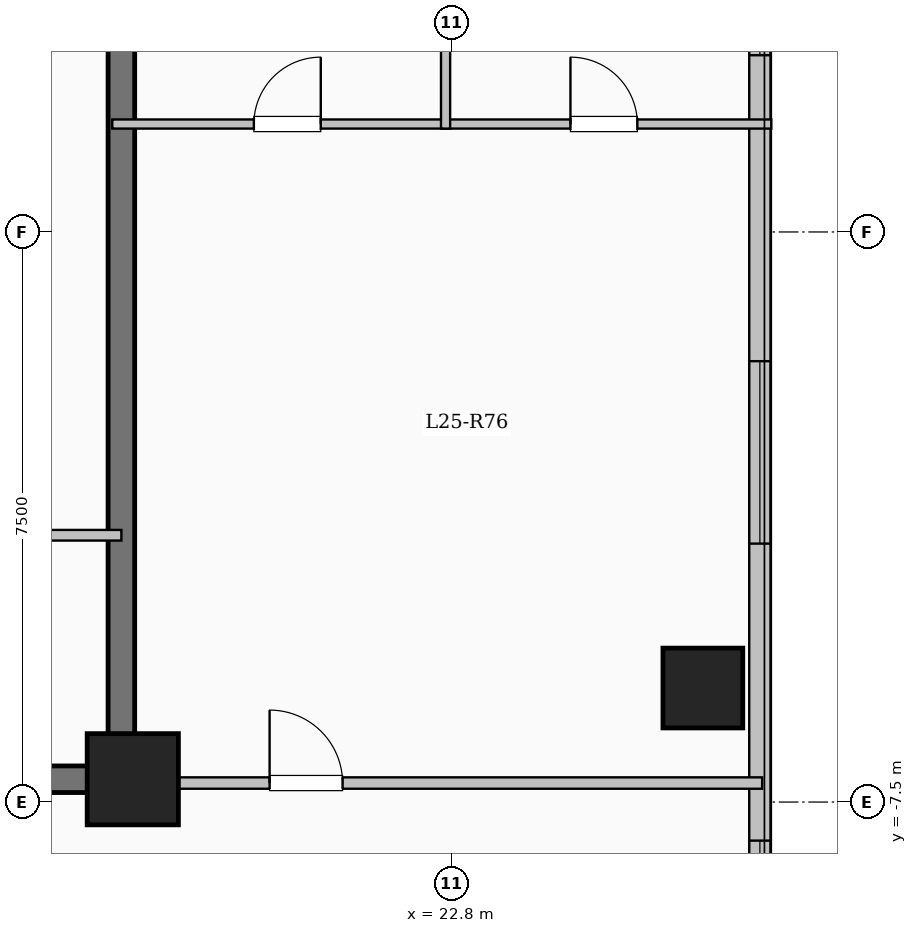
"""IFC4 building model, lengths in metres.
Left out: names, types, materials, properties, quantities, classifications, styles, units other than length and angle.
Written with IfcOpenShell. Run it as: python <this file> out.ifc"""

import sys

from ifc_helpers import new_model, si_unit, direction, frame, frame_2d, origin, origin_2d, place, context, subcontext, project, spatial, rectangle, extrude, element, fill, save


model = new_model("IFC4")
c1 = context("Model", 3, precision=1e-05, world=origin(), true_north=direction((0.0, 1.0)))
c2 = subcontext(c1, "Body", "Model", "MODEL_VIEW")
j1 = project(units=[si_unit("LENGTHUNIT", "METRE"), si_unit("PLANEANGLEUNIT", "RADIAN")], contexts=[c1])
p1 = place(None, origin())
s1 = spatial("IfcSite", under=j1, at=p1, CompositionType="ELEMENT")
p2 = place(p1, origin())
s2 = spatial("IfcBuilding", under=s1, at=p2, CompositionType="ELEMENT")
p3 = place(p2, frame((0.0, 0.0, 95.05)))
s3 = spatial("IfcBuildingStorey", under=s2, at=p3, CompositionType="ELEMENT", Elevation=95.05)
p4 = place(p3, frame((18.6, -7.2, 0.0), z_axis=(0.0, 0.0, 1.0), x_axis=(1.0, 0.0, 0.0)))
e1 = element("IfcColumn", 1, at=p4, inside=s3, PredefinedType="COLUMN", context=c2, shape_type="SweptSolid", body=[
    extrude(rectangle(XDim=1.2, YDim=1.2, at=origin_2d()), origin(), (0.0, 0.0, 1.0), 3.35),
])
p5 = place(p3, frame((26.1, -6.0, 0.0), z_axis=(0.0, 0.0, 1.0), x_axis=(1.0, 0.0, 0.0)))
e2 = element("IfcColumn", 2, at=p5, inside=s3, PredefinedType="COLUMN", context=c2, shape_type="SweptSolid", body=[
    extrude(rectangle(XDim=1.05, YDim=1.05, at=origin_2d()), origin(), (0.0, 0.0, 1.0), 3.35),
])
p6 = place(p3, frame((26.85, 17.85, 0.0), z_axis=(0.0, 0.0, 1.0), x_axis=(0.0, -1.0, 0.0)))
e3 = element("IfcWall", 3, at=p6, inside=s3, PredefinedType="SOLIDWALL", context=c2, shape_type="SweptSolid", body=[
    extrude(rectangle(XDim=35.7, YDim=0.28, at=frame_2d((17.85, 0.0))), origin(), (0.0, 0.0, 1.0), 3.1),
])
p7 = place(p6, frame((1.675, 0.0, 0.9)))
e4 = element("IfcOpeningElement", 4, at=p7, cuts=e3, PredefinedType="OPENING", context=c2, shape_type="SweptSolid", body=[
    extrude(rectangle(XDim=2.0, YDim=1.7, at=frame_2d((1.0, 0.85))), frame((0.0, 0.15, 0.0), z_axis=(0.0, -1.0, 0.0), x_axis=(1.0, 0.0, 0.0)), (0.0, 0.0, 1.0), 0.3),
])
p8 = place(p6, frame((5.725, 0.0, 0.95)))
e5 = element("IfcOpeningElement", 5, at=p8, cuts=e3, PredefinedType="OPENING", context=c2, shape_type="SweptSolid", body=[
    extrude(rectangle(XDim=1.0, YDim=1.5, at=frame_2d((0.5, 0.75))), frame((0.0, 0.15, 0.0), z_axis=(0.0, -1.0, 0.0), x_axis=(1.0, 0.0, 0.0)), (0.0, 0.0, 1.0), 0.3),
])
p9 = place(p6, frame((8.975, 0.0, 0.9)))
e6 = element("IfcOpeningElement", 6, at=p9, cuts=e3, PredefinedType="OPENING", context=c2, shape_type="SweptSolid", body=[
    extrude(rectangle(XDim=2.0, YDim=1.7, at=frame_2d((1.0, 0.85))), frame((0.0, 0.15, 0.0), z_axis=(0.0, -1.0, 0.0), x_axis=(1.0, 0.0, 0.0)), (0.0, 0.0, 1.0), 0.3),
])
p10 = place(p6, frame((13.725, 0.0, 0.9)))
e7 = element("IfcOpeningElement", 7, at=p10, cuts=e3, PredefinedType="OPENING", context=c2, shape_type="SweptSolid", body=[
    extrude(rectangle(XDim=1.8, YDim=1.65, at=frame_2d((0.9, 0.825))), frame((0.0, 0.15, 0.0), z_axis=(0.0, -1.0, 0.0), x_axis=(1.0, 0.0, 0.0)), (0.0, 0.0, 1.0), 0.3),
])
p11 = place(p6, frame((19.55, 0.0, 0.9)))
e8 = element("IfcOpeningElement", 8, at=p11, cuts=e3, PredefinedType="OPENING", context=c2, shape_type="SweptSolid", body=[
    extrude(rectangle(XDim=2.4, YDim=1.8, at=frame_2d((1.2, 0.9))), frame((0.0, 0.15, 0.0), z_axis=(0.0, -1.0, 0.0), x_axis=(1.0, 0.0, 0.0)), (0.0, 0.0, 1.0), 0.3),
])
p12 = place(p6, frame((25.857, 0.0, 0.9)))
e9 = element("IfcOpeningElement", 9, at=p12, cuts=e3, PredefinedType="OPENING", context=c2, shape_type="SweptSolid", body=[
    extrude(rectangle(XDim=1.5, YDim=1.65, at=frame_2d((0.75, 0.825))), frame((0.0, 0.15, 0.0), z_axis=(0.0, -1.0, 0.0), x_axis=(1.0, 0.0, 0.0)), (0.0, 0.0, 1.0), 0.3),
])
p13 = place(p6, frame((30.75, 0.0, 0.9)))
e10 = element("IfcOpeningElement", 10, at=p13, cuts=e3, PredefinedType="OPENING", context=c2, shape_type="SweptSolid", body=[
    extrude(rectangle(XDim=2.4, YDim=1.8, at=frame_2d((1.2, 0.9))), frame((0.0, 0.15, 0.0), z_axis=(0.0, -1.0, 0.0), x_axis=(1.0, 0.0, 0.0)), (0.0, 0.0, 1.0), 0.3),
])
p14 = place(p3, frame((18.45, -7.375, 0.0), z_axis=(0.0, 0.0, 1.0), x_axis=(0.0, 1.0, 0.0)))
e11 = element("IfcWall", 11, at=p14, inside=s3, PredefinedType="SHEAR", context=c2, shape_type="SweptSolid", body=[
    extrude(rectangle(XDim=14.05, YDim=0.35, at=frame_2d((7.025, 0.0))), origin(), (0.0, 0.0, 1.0), 3.35),
])
p15 = place(p3, frame((10.075, -7.2, 0.0), z_axis=(0.0, 0.0, 1.0), x_axis=(1.0, 0.0, 0.0)))
e12 = element("IfcWall", 12, at=p15, inside=s3, PredefinedType="SHEAR", context=c2, shape_type="SweptSolid", body=[
    extrude(rectangle(XDim=8.55, YDim=0.35, at=frame_2d((4.275, 0.0))), origin(), (0.0, 0.0, 1.0), 3.35),
])
p16 = place(p3, frame((15.4, -3.99, 0.0), z_axis=(0.0, 0.0, 1.0), x_axis=(1.0, 0.0, 0.0)))
e13 = element("IfcWall", 13, at=p16, inside=s3, PredefinedType="PARTITIONING", context=c2, shape_type="SweptSolid", body=[
    extrude(rectangle(XDim=3.05, YDim=0.14, at=frame_2d((1.525, 0.0))), origin(), (0.0, 0.0, 1.0), 3.1),
])
p17 = place(p16, frame((1.05, 0.0, 0.0)))
e14 = element("IfcOpeningElement", 14, at=p17, cuts=e13, PredefinedType="OPENING", context=c2, shape_type="SweptSolid", body=[
    extrude(rectangle(XDim=0.9, YDim=2.08, at=frame_2d((0.45, 1.04))), frame((0.0, 0.08, 0.0), z_axis=(0.0, -1.0, 0.0), x_axis=(1.0, 0.0, 0.0)), (0.0, 0.0, 1.0), 0.16),
])
p18 = place(p3, frame((18.45, -7.25, 0.0), z_axis=(0.0, 0.0, 1.0), x_axis=(1.0, 0.0, 0.0)))
e15 = element("IfcWall", 15, at=p18, inside=s3, PredefinedType="PARTITIONING", context=c2, shape_type="SweptSolid", body=[
    extrude(rectangle(XDim=8.43, YDim=0.15, at=frame_2d((4.215, 0.0))), origin(), (0.0, 0.0, 1.0), 3.1),
])
p19 = place(p18, frame((1.95, 0.0, 0.0)))
e16 = element("IfcOpeningElement", 16, at=p19, cuts=e15, PredefinedType="OPENING", context=c2, shape_type="SweptSolid", body=[
    extrude(rectangle(XDim=0.96, YDim=2.15, at=frame_2d((0.48, 1.075))), frame((0.0, 0.085, 0.0), z_axis=(0.0, -1.0, 0.0), x_axis=(1.0, 0.0, 0.0)), (0.0, 0.0, 1.0), 0.17),
])
p20 = place(p3, frame((18.33, 1.42, 0.0), z_axis=(0.0, 0.0, 1.0), x_axis=(1.0, 0.0, 0.0)))
e17 = element("IfcWall", 17, at=p20, inside=s3, PredefinedType="PARTITIONING", context=c2, shape_type="SweptSolid", body=[
    extrude(rectangle(XDim=8.67, YDim=0.12, at=frame_2d((4.335, 0.0))), origin(), (0.0, 0.0, 1.0), 3.1),
])
p21 = place(p20, frame((1.863, 0.0, 0.0)))
e18 = element("IfcOpeningElement", 18, at=p21, cuts=e17, PredefinedType="OPENING", context=c2, shape_type="SweptSolid", body=[
    extrude(rectangle(XDim=0.88, YDim=2.1, at=frame_2d((0.44, 1.05))), frame((0.0, 0.07, 0.0), z_axis=(0.0, -1.0, 0.0), x_axis=(1.0, 0.0, 0.0)), (0.0, 0.0, 1.0), 0.14),
])
p22 = place(p20, frame((6.028, 0.0, 0.0)))
e19 = element("IfcOpeningElement", 19, at=p22, cuts=e17, PredefinedType="OPENING", context=c2, shape_type="SweptSolid", body=[
    extrude(rectangle(XDim=0.88, YDim=2.1, at=frame_2d((0.44, 1.05))), frame((0.0, 0.07, 0.0), z_axis=(0.0, -1.0, 0.0), x_axis=(1.0, 0.0, 0.0)), (0.0, 0.0, 1.0), 0.14),
])
p23 = place(p3, frame((22.715, 1.36, 0.0), z_axis=(0.0, 0.0, 1.0), x_axis=(0.0, 1.0, 0.0)))
e20 = element("IfcWall", 20, at=p23, inside=s3, PredefinedType="PARTITIONING", context=c2, shape_type="SweptSolid", body=[
    extrude(rectangle(XDim=3.58, YDim=0.12, at=frame_2d((1.79, 0.0))), origin(), (0.0, 0.0, 1.0), 3.1),
])
p24 = place(p10, origin())
e21 = element("IfcWindow", 21, at=p24, inside=s3, PartitioningType="SINGLE_PANEL", PredefinedType="WINDOW", context=c2, shape_type="SweptSolid", body=[
    extrude(rectangle(XDim=1.8, YDim=1.65, at=frame_2d((0.9, 0.825))), frame((0.0, 0.03, 0.0), z_axis=(0.0, -1.0, 0.0), x_axis=(1.0, 0.0, 0.0)), (0.0, 0.0, 1.0), 0.06),
])
fill(e7, e21)
p25 = place(p11, origin())
e22 = element("IfcWindow", 22, at=p25, inside=s3, PartitioningType="SINGLE_PANEL", PredefinedType="WINDOW", context=c2, shape_type="SweptSolid", body=[
    extrude(rectangle(XDim=2.4, YDim=1.8, at=frame_2d((1.2, 0.9))), frame((0.0, 0.03, 0.0), z_axis=(0.0, -1.0, 0.0), x_axis=(1.0, 0.0, 0.0)), (0.0, 0.0, 1.0), 0.06),
])
fill(e8, e22)
p26 = place(p12, origin())
e23 = element("IfcWindow", 23, at=p26, inside=s3, PartitioningType="SINGLE_PANEL", PredefinedType="WINDOW", context=c2, shape_type="SweptSolid", body=[
    extrude(rectangle(XDim=1.5, YDim=1.65, at=frame_2d((0.75, 0.825))), frame((0.0, 0.03, 0.0), z_axis=(0.0, -1.0, 0.0), x_axis=(1.0, 0.0, 0.0)), (0.0, 0.0, 1.0), 0.06),
])
fill(e9, e23)
p27 = place(p19, origin())
e24 = element("IfcDoor", 24, at=p27, inside=s3, OperationType="SINGLE_SWING_LEFT", PredefinedType="DOOR", context=c2, shape_type="SweptSolid", body=[
    extrude(rectangle(XDim=0.96, YDim=2.15, at=frame_2d((0.48, 1.075))), frame((0.0, 0.025, 0.0), z_axis=(0.0, -1.0, 0.0), x_axis=(1.0, 0.0, 0.0)), (0.0, 0.0, 1.0), 0.05),
])
fill(e16, e24)
p28 = place(p21, origin())
e25 = element("IfcDoor", 25, at=p28, inside=s3, OperationType="SINGLE_SWING_RIGHT", PredefinedType="DOOR", context=c2, shape_type="SweptSolid", body=[
    extrude(rectangle(XDim=0.88, YDim=2.1, at=frame_2d((0.44, 1.05))), frame((0.0, 0.025, 0.0), z_axis=(0.0, -1.0, 0.0), x_axis=(1.0, 0.0, 0.0)), (0.0, 0.0, 1.0), 0.05),
])
fill(e18, e25)
p29 = place(p22, origin())
e26 = element("IfcDoor", 26, at=p29, inside=s3, OperationType="SINGLE_SWING_LEFT", PredefinedType="DOOR", context=c2, shape_type="SweptSolid", body=[
    extrude(rectangle(XDim=0.88, YDim=2.1, at=frame_2d((0.44, 1.05))), frame((0.0, 0.025, 0.0), z_axis=(0.0, -1.0, 0.0), x_axis=(1.0, 0.0, 0.0)), (0.0, 0.0, 1.0), 0.05),
])
fill(e19, e26)
save(model, sys.argv[1])
